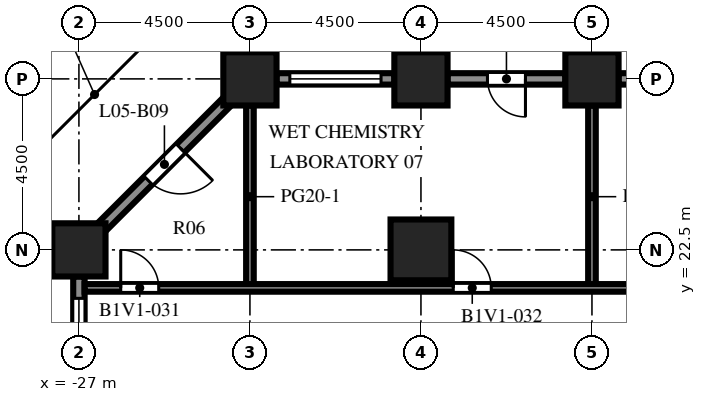
"""IFC4 building model, lengths in metres.
Left out: names, types, materials, properties, quantities, classifications, styles, units other than length and angle.
Written with IfcOpenShell. Run it as: python <this file> out.ifc"""

import sys

from ifc_helpers import new_model, si_unit, direction, frame, frame_2d, origin, origin_2d, place, context, subcontext, project, spatial, rectangle, extrude, element, fill, save


model = new_model("IFC4")
c1 = context("Model", 3, precision=1e-05, world=origin(), true_north=direction((0.0, 1.0)))
c2 = subcontext(c1, "Body", "Model", "MODEL_VIEW")
j1 = project(units=[si_unit("LENGTHUNIT", "METRE"), si_unit("PLANEANGLEUNIT", "RADIAN")], contexts=[c1])
p1 = place(None, origin())
s1 = spatial("IfcSite", under=j1, at=p1, CompositionType="ELEMENT")
p2 = place(p1, origin())
s2 = spatial("IfcBuilding", under=s1, at=p2, CompositionType="ELEMENT")
p3 = place(p2, frame((0.0, 0.0, 23.6)))
s3 = spatial("IfcBuildingStorey", under=s2, at=p3, CompositionType="ELEMENT", Elevation=23.6)
for number, where, z_axis, x_axis in (
    (1, (-27.0, 22.5, 0.0), (0.0, 0.0, 1.0), (1.0, 0.0, 0.0)),
    (2, (-22.5, 27.0, 0.0), (0.0, 0.0, 1.0), (1.0, 0.0, 0.0)),
    (3, (-18.0, 27.0, 0.0), (0.0, 0.0, 1.0), (1.0, 0.0, 0.0)),
    (4, (-13.5, 27.0, 0.0), (0.0, 0.0, 1.0), (1.0, 0.0, 0.0)),
):
    element("IfcColumn", number, at=place(p3, frame(where, z_axis=z_axis, x_axis=x_axis)), inside=s3, PredefinedType="COLUMN", context=c2, shape_type="SweptSolid", body=[
        extrude(rectangle(XDim=1.4, YDim=1.4, at=origin_2d()), origin(), (0.0, 0.0, 1.0), 4.1),
    ])
p4 = place(p3, frame((-18.0, 22.5, 0.0), z_axis=(0.0, 0.0, 1.0), x_axis=(1.0, 0.0, 0.0)))
e5 = element("IfcColumn", 5, at=p4, inside=s3, PredefinedType="COLUMN", context=c2, shape_type="SweptSolid", body=[
    extrude(rectangle(XDim=1.6, YDim=1.6, at=origin_2d()), origin(), (0.0, 0.0, 1.0), 4.1),
])
p5 = place(p3, frame((-12.8, 27.0, 0.0), z_axis=(0.0, 0.0, 1.0), x_axis=(1.0, 0.0, 0.0)))
e6 = element("IfcWall", 6, at=p5, inside=s3, PredefinedType="SOLIDWALL", context=c2, shape_type="SweptSolid", body=[
    extrude(rectangle(XDim=3.1, YDim=0.3, at=frame_2d((1.55, 0.0))), origin(), (0.0, 0.0, 1.0), 2.75),
])
p6 = place(p5, frame((0.35, 0.0, 0.8)))
e7 = element("IfcOpeningElement", 7, at=p6, cuts=e6, PredefinedType="OPENING", context=c2, shape_type="SweptSolid", body=[
    extrude(rectangle(XDim=2.4, YDim=1.7, at=frame_2d((1.2, 0.85))), frame((0.0, 0.16, 0.0), z_axis=(0.0, -1.0, 0.0), x_axis=(1.0, 0.0, 0.0)), (0.0, 0.0, 1.0), 0.32),
])
p7 = place(p3, frame((-17.3, 27.0, 0.0), z_axis=(0.0, 0.0, 1.0), x_axis=(1.0, 0.0, 0.0)))
e8 = element("IfcWall", 8, at=p7, inside=s3, PredefinedType="SOLIDWALL", context=c2, shape_type="SweptSolid", body=[
    extrude(rectangle(XDim=3.1, YDim=0.3, at=frame_2d((1.55, 0.0))), origin(), (0.0, 0.0, 1.0), 2.75),
])
p8 = place(p7, frame((1.05, 0.0, 0.0)))
e9 = element("IfcOpeningElement", 9, at=p8, cuts=e8, PredefinedType="OPENING", context=c2, shape_type="SweptSolid", body=[
    extrude(rectangle(XDim=1.0, YDim=2.2, at=frame_2d((0.5, 1.1))), frame((0.0, 0.16, 0.0), z_axis=(0.0, -1.0, 0.0), x_axis=(1.0, 0.0, 0.0)), (0.0, 0.0, 1.0), 0.32),
])
p9 = place(p3, frame((-21.8, 27.0, 0.0), z_axis=(0.0, 0.0, 1.0), x_axis=(1.0, 0.0, 0.0)))
e10 = element("IfcWall", 10, at=p9, inside=s3, PredefinedType="SOLIDWALL", context=c2, shape_type="SweptSolid", body=[
    extrude(rectangle(XDim=3.1, YDim=0.3, at=frame_2d((1.55, 0.0))), origin(), (0.0, 0.0, 1.0), 2.75),
])
p10 = place(p9, frame((0.35, 0.0, 0.8)))
e11 = element("IfcOpeningElement", 11, at=p10, cuts=e10, PredefinedType="OPENING", context=c2, shape_type="SweptSolid", body=[
    extrude(rectangle(XDim=2.4, YDim=1.7, at=frame_2d((1.2, 0.85))), frame((0.0, 0.16, 0.0), z_axis=(0.0, -1.0, 0.0), x_axis=(1.0, 0.0, 0.0)), (0.0, 0.0, 1.0), 0.32),
])
p11 = place(p3, frame((-26.406, 23.094, 0.0), z_axis=(0.0, 0.0, 1.0), x_axis=(0.707106781187, 0.707106781187, 0.0)))
e12 = element("IfcWall", 12, at=p11, inside=s3, PredefinedType="SOLIDWALL", context=c2, shape_type="SweptSolid", body=[
    extrude(rectangle(XDim=4.684, YDim=0.3, at=frame_2d((2.342, 0.0))), origin(), (0.0, 0.0, 1.0), 2.75),
])
p12 = place(p11, frame((1.742, 0.0, 0.0)))
e13 = element("IfcOpeningElement", 13, at=p12, cuts=e12, PredefinedType="OPENING", context=c2, shape_type="SweptSolid", body=[
    extrude(rectangle(XDim=1.2, YDim=2.2, at=frame_2d((0.6, 1.1))), frame((0.0, 0.16, 0.0), z_axis=(0.0, -1.0, 0.0), x_axis=(1.0, 0.0, 0.0)), (0.0, 0.0, 1.0), 0.32),
])
p13 = place(p3, frame((-27.0, 18.7, 0.0), z_axis=(0.0, 0.0, 1.0), x_axis=(0.0, 1.0, 0.0)))
e14 = element("IfcWall", 14, at=p13, inside=s3, PredefinedType="SOLIDWALL", context=c2, shape_type="SweptSolid", body=[
    extrude(rectangle(XDim=3.1, YDim=0.3, at=frame_2d((1.55, 0.0))), origin(), (0.0, 0.0, 1.0), 2.75),
])
p14 = place(p13, frame((0.125, 0.0, 0.8)))
e15 = element("IfcOpeningElement", 15, at=p14, cuts=e14, PredefinedType="OPENING", context=c2, shape_type="SweptSolid", body=[
    extrude(rectangle(XDim=2.4, YDim=1.7, at=frame_2d((1.2, 0.85))), frame((0.0, 0.16, 0.0), z_axis=(0.0, -1.0, 0.0), x_axis=(1.0, 0.0, 0.0)), (0.0, 0.0, 1.0), 0.32),
])
for number, where, z_axis, x_axis in (
    (16, (-22.5, 21.5, 0.0), (0.0, 0.0, 1.0), (0.0, 1.0, 0.0)),
    (17, (-13.5, 21.5, 0.0), (0.0, 0.0, 1.0), (0.0, 1.0, 0.0)),
):
    element("IfcWall", number, at=place(p3, frame(where, z_axis=z_axis, x_axis=x_axis)), inside=s3, PredefinedType="PARTITIONING", context=c2, shape_type="SweptSolid", body=[
        extrude(rectangle(XDim=4.8, YDim=0.2, at=frame_2d((2.4, 0.0))), origin(), (0.0, 0.0, 1.0), 3.65),
    ])
p15 = place(p3, frame((-26.85, 21.5, 0.0), z_axis=(0.0, 0.0, 1.0), x_axis=(1.0, 0.0, 0.0)))
e18 = element("IfcWall", 18, at=p15, inside=s3, PredefinedType="PARTITIONING", context=c2, shape_type="SweptSolid", body=[
    extrude(rectangle(XDim=53.7, YDim=0.2, at=frame_2d((26.85, 0.0))), origin(), (0.0, 0.0, 1.0), 3.65),
])
p16 = place(p15, frame((0.95, 0.0, 0.0)))
e19 = element("IfcOpeningElement", 19, at=p16, cuts=e18, PredefinedType="OPENING", context=c2, shape_type="SweptSolid", body=[
    extrude(rectangle(XDim=1.0, YDim=2.1, at=frame_2d((0.5, 1.05))), frame((0.0, 0.11, 0.0), z_axis=(0.0, -1.0, 0.0), x_axis=(1.0, 0.0, 0.0)), (0.0, 0.0, 1.0), 0.22),
])
p17 = place(p15, frame((9.7, 0.0, 0.0)))
e20 = element("IfcOpeningElement", 20, at=p17, cuts=e18, PredefinedType="OPENING", context=c2, shape_type="SweptSolid", body=[
    extrude(rectangle(XDim=1.0, YDim=2.1, at=frame_2d((0.5, 1.05))), frame((0.0, 0.11, 0.0), z_axis=(0.0, -1.0, 0.0), x_axis=(1.0, 0.0, 0.0)), (0.0, 0.0, 1.0), 0.22),
])
p18 = place(p15, frame((15.2, 0.0, 0.0)))
e21 = element("IfcOpeningElement", 21, at=p18, cuts=e18, PredefinedType="OPENING", context=c2, shape_type="SweptSolid", body=[
    extrude(rectangle(XDim=1.0, YDim=2.1, at=frame_2d((0.5, 1.05))), frame((0.0, 0.11, 0.0), z_axis=(0.0, -1.0, 0.0), x_axis=(1.0, 0.0, 0.0)), (0.0, 0.0, 1.0), 0.22),
])
p19 = place(p15, frame((24.95, 0.0, 0.0)))
e22 = element("IfcOpeningElement", 22, at=p19, cuts=e18, PredefinedType="OPENING", context=c2, shape_type="SweptSolid", body=[
    extrude(rectangle(XDim=1.0, YDim=2.1, at=frame_2d((0.5, 1.05))), frame((0.0, 0.11, 0.0), z_axis=(0.0, -1.0, 0.0), x_axis=(1.0, 0.0, 0.0)), (0.0, 0.0, 1.0), 0.22),
])
p20 = place(p15, frame((32.95, 0.0, 0.0)))
e23 = element("IfcOpeningElement", 23, at=p20, cuts=e18, PredefinedType="OPENING", context=c2, shape_type="SweptSolid", body=[
    extrude(rectangle(XDim=1.0, YDim=2.1, at=frame_2d((0.5, 1.05))), frame((0.0, 0.11, 0.0), z_axis=(0.0, -1.0, 0.0), x_axis=(1.0, 0.0, 0.0)), (0.0, 0.0, 1.0), 0.22),
])
p21 = place(p15, frame((38.7, 0.0, 0.0)))
e24 = element("IfcOpeningElement", 24, at=p21, cuts=e18, PredefinedType="OPENING", context=c2, shape_type="SweptSolid", body=[
    extrude(rectangle(XDim=1.0, YDim=2.1, at=frame_2d((0.5, 1.05))), frame((0.0, 0.11, 0.0), z_axis=(0.0, -1.0, 0.0), x_axis=(1.0, 0.0, 0.0)), (0.0, 0.0, 1.0), 0.22),
])
p22 = place(p15, frame((45.95, 0.0, 0.0)))
e25 = element("IfcOpeningElement", 25, at=p22, cuts=e18, PredefinedType="OPENING", context=c2, shape_type="SweptSolid", body=[
    extrude(rectangle(XDim=1.0, YDim=2.1, at=frame_2d((0.5, 1.05))), frame((0.0, 0.11, 0.0), z_axis=(0.0, -1.0, 0.0), x_axis=(1.0, 0.0, 0.0)), (0.0, 0.0, 1.0), 0.22),
])
p23 = place(p15, frame((50.7, 0.0, 0.0)))
e26 = element("IfcOpeningElement", 26, at=p23, cuts=e18, PredefinedType="OPENING", context=c2, shape_type="SweptSolid", body=[
    extrude(rectangle(XDim=1.0, YDim=2.1, at=frame_2d((0.5, 1.05))), frame((0.0, 0.11, 0.0), z_axis=(0.0, -1.0, 0.0), x_axis=(1.0, 0.0, 0.0)), (0.0, 0.0, 1.0), 0.22),
])
p24 = place(p8, origin())
e27 = element("IfcDoor", 27, at=p24, inside=s3, OperationType="SINGLE_SWING_RIGHT", PredefinedType="DOOR", context=c2, shape_type="SweptSolid", body=[
    extrude(rectangle(XDim=1.0, YDim=2.2, at=frame_2d((0.5, 1.1))), frame((0.0, 0.025, 0.0), z_axis=(0.0, -1.0, 0.0), x_axis=(1.0, 0.0, 0.0)), (0.0, 0.0, 1.0), 0.05),
])
fill(e9, e27)
p25 = place(p10, origin())
e28 = element("IfcWindow", 28, at=p25, inside=s3, PartitioningType="SINGLE_PANEL", PredefinedType="WINDOW", context=c2, shape_type="SweptSolid", body=[
    extrude(rectangle(XDim=2.4, YDim=1.7, at=frame_2d((1.2, 0.85))), frame((0.0, 0.03, 0.0), z_axis=(0.0, -1.0, 0.0), x_axis=(1.0, 0.0, 0.0)), (0.0, 0.0, 1.0), 0.06),
])
fill(e11, e28)
p26 = place(p12, origin())
e29 = element("IfcDoor", 29, at=p26, inside=s3, OperationType="SINGLE_SWING_RIGHT", PredefinedType="DOOR", context=c2, shape_type="SweptSolid", body=[
    extrude(rectangle(XDim=1.2, YDim=2.2, at=frame_2d((0.6, 1.1))), frame((0.0, 0.025, 0.0), z_axis=(0.0, -1.0, 0.0), x_axis=(1.0, 0.0, 0.0)), (0.0, 0.0, 1.0), 0.05),
])
fill(e13, e29)
p27 = place(p14, origin())
e30 = element("IfcWindow", 30, at=p27, inside=s3, PartitioningType="SINGLE_PANEL", PredefinedType="WINDOW", context=c2, shape_type="SweptSolid", body=[
    extrude(rectangle(XDim=2.4, YDim=1.7, at=frame_2d((1.2, 0.85))), frame((0.0, 0.03, 0.0), z_axis=(0.0, -1.0, 0.0), x_axis=(1.0, 0.0, 0.0)), (0.0, 0.0, 1.0), 0.06),
])
fill(e15, e30)
p28 = place(p16, origin())
e31 = element("IfcDoor", 31, at=p28, inside=s3, OperationType="SINGLE_SWING_LEFT", PredefinedType="DOOR", context=c2, shape_type="SweptSolid", body=[
    extrude(rectangle(XDim=1.0, YDim=2.1, at=frame_2d((0.5, 1.05))), frame((0.0, 0.025, 0.0), z_axis=(0.0, -1.0, 0.0), x_axis=(1.0, 0.0, 0.0)), (0.0, 0.0, 1.0), 0.05),
])
fill(e19, e31)
p29 = place(p17, origin())
e32 = element("IfcDoor", 32, at=p29, inside=s3, OperationType="SINGLE_SWING_LEFT", PredefinedType="DOOR", context=c2, shape_type="SweptSolid", body=[
    extrude(rectangle(XDim=1.0, YDim=2.1, at=frame_2d((0.5, 1.05))), frame((0.0, 0.025, 0.0), z_axis=(0.0, -1.0, 0.0), x_axis=(1.0, 0.0, 0.0)), (0.0, 0.0, 1.0), 0.05),
])
fill(e20, e32)
save(model, sys.argv[1])
